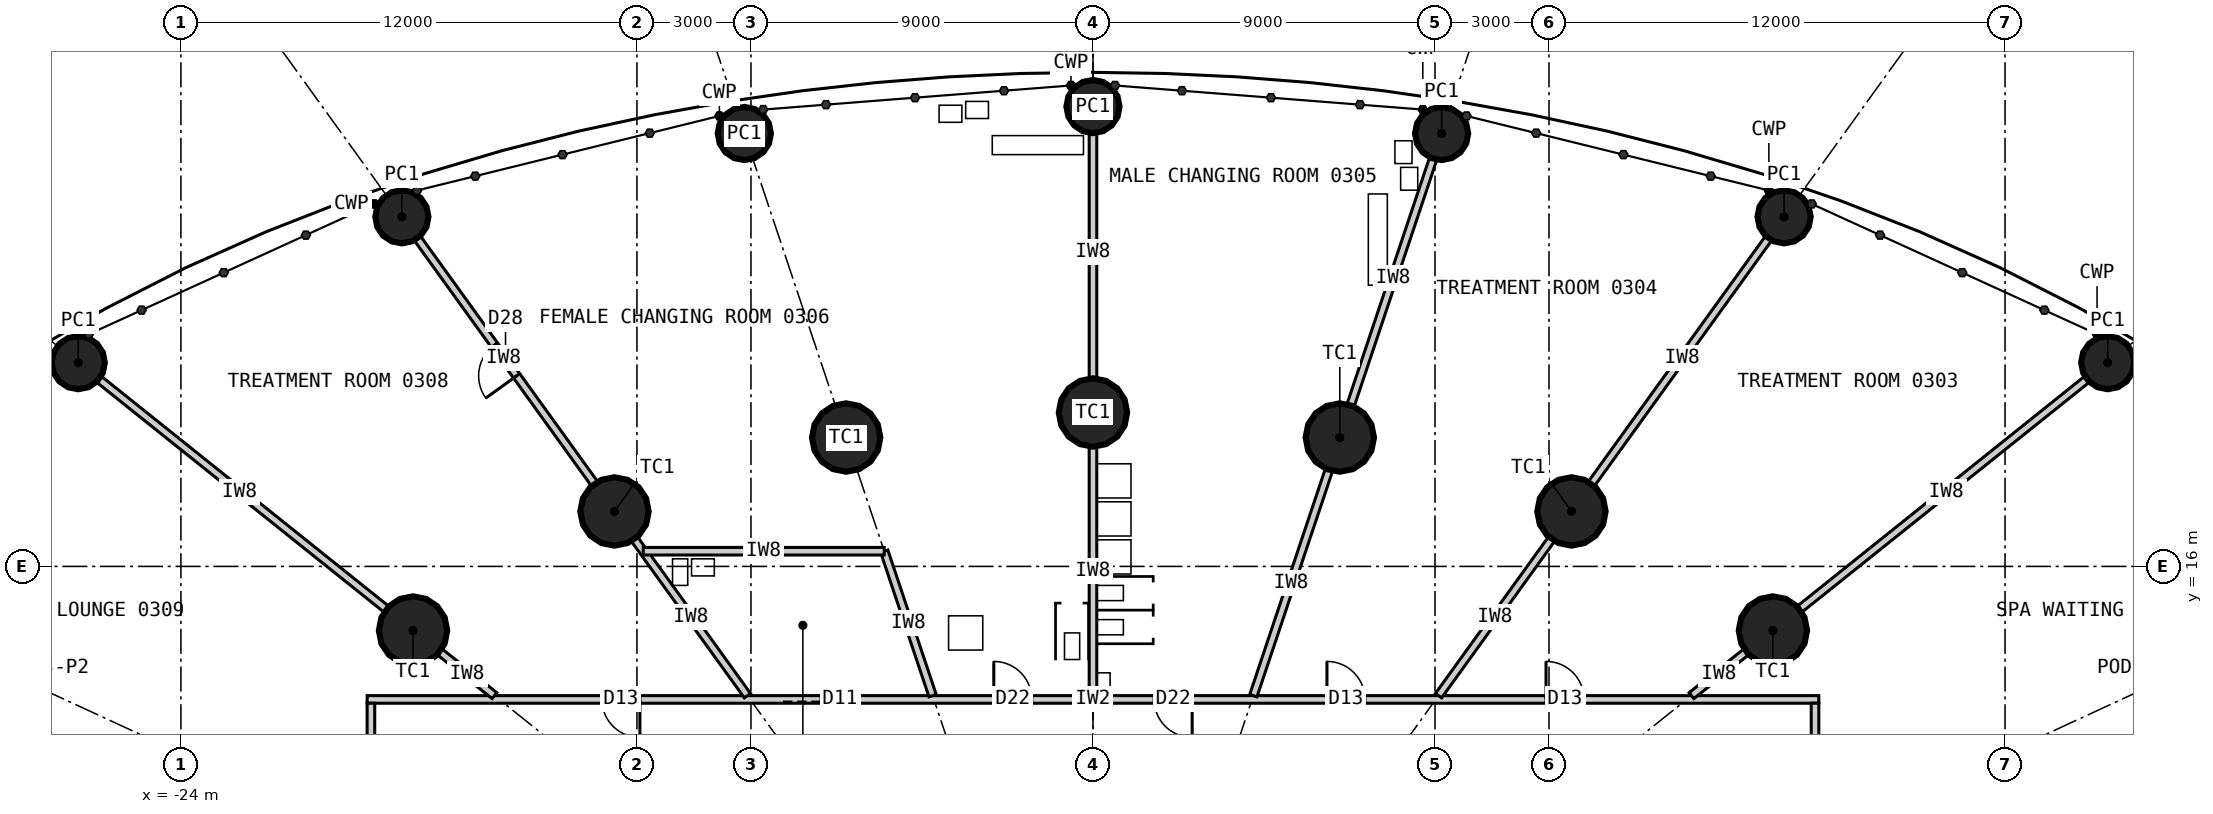
"""IFC4 building model, lengths in metres.
Left out: names, types, materials, properties, quantities, classifications, styles, units other than length and angle.
Written with IfcOpenShell. Run it as: python <this file> out.ifc"""

import sys

from ifc_helpers import new_model, si_unit, direction, frame, frame_2d, origin, origin_2d, place, context, subcontext, project, spatial, rectangle, circle, extrude, element, fill, save


model = new_model("IFC4")
c1 = context("Model", 3, precision=1e-05, world=origin(), true_north=direction((0.0, 1.0)))
c2 = subcontext(c1, "Body", "Model", "MODEL_VIEW")
j1 = project(units=[si_unit("LENGTHUNIT", "METRE"), si_unit("PLANEANGLEUNIT", "RADIAN")], contexts=[c1])
p1 = place(None, origin())
s1 = spatial("IfcSite", under=j1, at=p1, CompositionType="ELEMENT")
p2 = place(p1, origin())
s2 = spatial("IfcBuilding", under=s1, at=p2, CompositionType="ELEMENT")
p3 = place(p2, frame((0.0, 0.0, 19.2)))
s3 = spatial("IfcBuildingStorey", under=s2, at=p3, CompositionType="ELEMENT", Elevation=19.2)
for number, where, z_axis, x_axis in (
    (1, (17.892, 14.313, 0.0), (0.0, 0.0, 1.0), (1.0, 0.0, 0.0)),
    (2, (12.591, 17.447, 0.0), (0.0, 0.0, 1.0), (1.0, 0.0, 0.0)),
    (3, (6.495, 19.391, 0.0), (0.0, 0.0, 1.0), (1.0, 0.0, 0.0)),
    (4, (0.0, 20.05, 0.0), (0.0, 0.0, 1.0), (1.0, 0.0, 0.0)),
    (5, (-6.495, 19.391, 0.0), (0.0, 0.0, 1.0), (1.0, 0.0, 0.0)),
    (6, (-12.591, 17.447, 0.0), (0.0, 0.0, 1.0), (1.0, 0.0, 0.0)),
    (7, (-17.892, 14.313, 0.0), (0.0, 0.0, 1.0), (1.0, 0.0, 0.0)),
):
    element("IfcColumn", number, at=place(p3, frame(where, z_axis=z_axis, x_axis=x_axis)), inside=s3, PredefinedType="COLUMN", context=c2, shape_type="SweptSolid", body=[
        extrude(circle(Radius=0.9, at=origin_2d()), origin(), (0.0, 0.0, 1.0), 5.4),
    ])
for number, where, z_axis, x_axis in (
    (8, (26.702, 21.362, 0.0), (0.0, 0.0, 1.0), (1.0, 0.0, 0.0)),
    (9, (18.186, 25.199, 0.0), (0.0, 0.0, 1.0), (1.0, 0.0, 0.0)),
    (10, (9.174, 27.391, 0.0), (0.0, 0.0, 1.0), (1.0, 0.0, 0.0)),
    (11, (0.0, 28.1, 0.0), (0.0, 0.0, 1.0), (1.0, 0.0, 0.0)),
    (12, (-9.174, 27.391, 0.0), (0.0, 0.0, 1.0), (1.0, 0.0, 0.0)),
    (13, (-18.186, 25.199, 0.0), (0.0, 0.0, 1.0), (1.0, 0.0, 0.0)),
    (14, (-26.702, 21.362, 0.0), (0.0, 0.0, 1.0), (1.0, 0.0, 0.0)),
):
    element("IfcColumn", number, at=place(p3, frame(where, z_axis=z_axis, x_axis=x_axis)), inside=s3, PredefinedType="COLUMN", context=c2, shape_type="SweptSolid", body=[
        extrude(circle(Radius=0.7, at=origin_2d()), origin(), (0.0, 0.0, 1.0), 5.4),
    ])
p4 = place(p3, frame((-19.1, 12.5, 0.0), z_axis=(0.0, 0.0, 1.0), x_axis=(1.0, 0.0, 0.0)))
e15 = element("IfcWall", 15, at=p4, inside=s3, PredefinedType="PARTITIONING", context=c2, shape_type="SweptSolid", body=[
    extrude(rectangle(XDim=38.2, YDim=0.2, at=frame_2d((19.1, 0.0))), origin(), (0.0, 0.0, 1.0), 5.15),
])
p5 = place(p4, frame((31.022, 0.0, 0.0)))
e16 = element("IfcOpeningElement", 16, at=p5, cuts=e15, PredefinedType="OPENING", context=c2, shape_type="SweptSolid", body=[
    extrude(rectangle(XDim=1.0, YDim=2.2, at=frame_2d((0.5, 1.1))), frame((0.0, 0.11, 0.0), z_axis=(0.0, -1.0, 0.0), x_axis=(1.0, 0.0, 0.0)), (0.0, 0.0, 1.0), 0.22),
])
p6 = place(p4, frame((25.257, 0.0, 0.0)))
e17 = element("IfcOpeningElement", 17, at=p6, cuts=e15, PredefinedType="OPENING", context=c2, shape_type="SweptSolid", body=[
    extrude(rectangle(XDim=1.0, YDim=2.2, at=frame_2d((0.5, 1.1))), frame((0.0, 0.11, 0.0), z_axis=(0.0, -1.0, 0.0), x_axis=(1.0, 0.0, 0.0)), (0.0, 0.0, 1.0), 0.22),
])
p7 = place(p4, frame((20.71, 0.0, 0.0)))
e18 = element("IfcOpeningElement", 18, at=p7, cuts=e15, PredefinedType="OPENING", context=c2, shape_type="SweptSolid", body=[
    extrude(rectangle(XDim=1.0, YDim=2.1, at=frame_2d((0.5, 1.05))), frame((0.0, 0.11, 0.0), z_axis=(0.0, -1.0, 0.0), x_axis=(1.0, 0.0, 0.0)), (0.0, 0.0, 1.0), 0.22),
])
p8 = place(p4, frame((16.49, 0.0, 0.0)))
e19 = element("IfcOpeningElement", 19, at=p8, cuts=e15, PredefinedType="OPENING", context=c2, shape_type="SweptSolid", body=[
    extrude(rectangle(XDim=1.0, YDim=2.1, at=frame_2d((0.5, 1.05))), frame((0.0, 0.11, 0.0), z_axis=(0.0, -1.0, 0.0), x_axis=(1.0, 0.0, 0.0)), (0.0, 0.0, 1.0), 0.22),
])
p9 = place(p4, frame((11.943, 0.0, 0.0)))
e20 = element("IfcOpeningElement", 20, at=p9, cuts=e15, PredefinedType="OPENING", context=c2, shape_type="SweptSolid", body=[
    extrude(rectangle(XDim=1.0, YDim=2.2, at=frame_2d((0.5, 1.1))), frame((0.0, 0.11, 0.0), z_axis=(0.0, -1.0, 0.0), x_axis=(1.0, 0.0, 0.0)), (0.0, 0.0, 1.0), 0.22),
])
p10 = place(p4, frame((6.178, 0.0, 0.0)))
e21 = element("IfcOpeningElement", 21, at=p10, cuts=e15, PredefinedType="OPENING", context=c2, shape_type="SweptSolid", body=[
    extrude(rectangle(XDim=1.0, YDim=2.2, at=frame_2d((0.5, 1.1))), frame((0.0, 0.11, 0.0), z_axis=(0.0, -1.0, 0.0), x_axis=(1.0, 0.0, 0.0)), (0.0, 0.0, 1.0), 0.22),
])
p11 = place(p3, frame((19.0, -12.4, 0.0), z_axis=(0.0, 0.0, 1.0), x_axis=(0.0, 1.0, 0.0)))
e22 = element("IfcWall", 22, at=p11, inside=s3, PredefinedType="PARTITIONING", context=c2, shape_type="SweptSolid", body=[
    extrude(rectangle(XDim=24.8, YDim=0.2, at=frame_2d((12.4, 0.0))), origin(), (0.0, 0.0, 1.0), 5.15),
])
p12 = place(p11, frame((17.8, 0.0, 0.0)))
e23 = element("IfcOpeningElement", 23, at=p12, cuts=e22, PredefinedType="OPENING", context=c2, shape_type="SweptSolid", body=[
    extrude(rectangle(XDim=1.8, YDim=2.4, at=frame_2d((0.9, 1.2))), frame((0.0, 0.11, 0.0), z_axis=(0.0, -1.0, 0.0), x_axis=(1.0, 0.0, 0.0)), (0.0, 0.0, 1.0), 0.22),
])
p13 = place(p3, frame((-19.0, 12.4, 0.0), z_axis=(0.0, 0.0, 1.0), x_axis=(0.0, -1.0, 0.0)))
e24 = element("IfcWall", 24, at=p13, inside=s3, PredefinedType="PARTITIONING", context=c2, shape_type="SweptSolid", body=[
    extrude(rectangle(XDim=24.8, YDim=0.2, at=frame_2d((12.4, 0.0))), origin(), (0.0, 0.0, 1.0), 5.15),
])
p14 = place(p13, frame((5.2, 0.0, 0.0)))
e25 = element("IfcOpeningElement", 25, at=p14, cuts=e24, PredefinedType="OPENING", context=c2, shape_type="SweptSolid", body=[
    extrude(rectangle(XDim=1.8, YDim=2.4, at=frame_2d((0.9, 1.2))), frame((0.0, 0.11, 0.0), z_axis=(0.0, -1.0, 0.0), x_axis=(1.0, 0.0, 0.0)), (0.0, 0.0, 1.0), 0.22),
])
p15 = place(p13, frame((17.8, 0.0, 0.0)))
e26 = element("IfcOpeningElement", 26, at=p15, cuts=e24, PredefinedType="OPENING", context=c2, shape_type="SweptSolid", body=[
    extrude(rectangle(XDim=1.8, YDim=2.4, at=frame_2d((0.9, 1.2))), frame((0.0, 0.11, 0.0), z_axis=(0.0, -1.0, 0.0), x_axis=(1.0, 0.0, 0.0)), (0.0, 0.0, 1.0), 0.22),
])
p16 = place(p3, frame((15.75, 12.6, 0.0), z_axis=(0.0, 0.0, 1.0), x_axis=(0.780881734892, 0.6246788904, 0.0)))
e27 = element("IfcWall", 27, at=p16, inside=s3, PredefinedType="PARTITIONING", context=c2, shape_type="SweptSolid", body=[
    extrude(rectangle(XDim=1.843, YDim=0.2, at=frame_2d((0.921, 0.0))), origin(), (0.0, 0.0, 1.0), 4.3),
])
p17 = place(p3, frame((18.594, 14.875, 0.0), z_axis=(0.0, 0.0, 1.0), x_axis=(0.780868809443, 0.624695047554, 0.0)))
e28 = element("IfcWall", 28, at=p17, inside=s3, PredefinedType="PARTITIONING", context=c2, shape_type="SweptSolid", body=[
    extrude(rectangle(XDim=9.883, YDim=0.2, at=frame_2d((4.941, 0.0))), origin(), (0.0, 0.0, 1.0), 4.25),
])
p18 = place(p3, frame((9.093, 12.6, 0.0), z_axis=(0.0, 0.0, 1.0), x_axis=(0.58522538525, 0.810870673079, 0.0)))
e29 = element("IfcWall", 29, at=p18, inside=s3, PredefinedType="PARTITIONING", context=c2, shape_type="SweptSolid", body=[
    extrude(rectangle(XDim=5.077, YDim=0.2, at=frame_2d((2.538, 0.0))), origin(), (0.0, 0.0, 1.0), 4.3),
])
p19 = place(p3, frame((13.118, 18.176, 0.0), z_axis=(0.0, 0.0, 1.0), x_axis=(0.585204349301, 0.810885854828, 0.0)))
e30 = element("IfcWall", 30, at=p19, inside=s3, PredefinedType="PARTITIONING", context=c2, shape_type="SweptSolid", body=[
    extrude(rectangle(XDim=8.161, YDim=0.2, at=frame_2d((4.081, 0.0))), origin(), (0.0, 0.0, 1.0), 4.25),
])
p20 = place(p3, frame((4.22, 12.6, 0.0), z_axis=(0.0, 0.0, 1.0), x_axis=(0.317584173452, 0.9482300843, 0.0)))
e31 = element("IfcWall", 31, at=p20, inside=s3, PredefinedType="PARTITIONING", context=c2, shape_type="SweptSolid", body=[
    extrude(rectangle(XDim=6.262, YDim=0.2, at=frame_2d((3.131, 0.0))), origin(), (0.0, 0.0, 1.0), 4.3),
])
p21 = place(p3, frame((6.781, 20.245, 0.0), z_axis=(0.0, 0.0, 1.0), x_axis=(0.317580622989, 0.948231273425, 0.0)))
e32 = element("IfcWall", 32, at=p21, inside=s3, PredefinedType="PARTITIONING", context=c2, shape_type="SweptSolid", body=[
    extrude(rectangle(XDim=7.036, YDim=0.2, at=frame_2d((3.518, 0.0))), origin(), (0.0, 0.0, 1.0), 4.25),
])
p22 = place(p3, frame((0.0, 12.6, 0.0), z_axis=(0.0, 0.0, 1.0), x_axis=(0.0, 1.0, 0.0)))
e33 = element("IfcWall", 33, at=p22, inside=s3, PredefinedType="PARTITIONING", context=c2, shape_type="SweptSolid", body=[
    extrude(rectangle(XDim=6.55, YDim=0.2, at=frame_2d((3.275, 0.0))), origin(), (0.0, 0.0, 1.0), 4.3),
])
p23 = place(p3, frame((0.0, 20.95, 0.0), z_axis=(0.0, 0.0, 1.0), x_axis=(0.0, 1.0, 0.0)))
e34 = element("IfcWall", 34, at=p23, inside=s3, PredefinedType="PARTITIONING", context=c2, shape_type="SweptSolid", body=[
    extrude(rectangle(XDim=6.65, YDim=0.2, at=frame_2d((3.325, 0.0))), origin(), (0.0, 0.0, 1.0), 4.25),
])
p24 = place(p3, frame((-4.22, 12.6, 0.0), z_axis=(0.0, 0.0, 1.0), x_axis=(-0.317598232025, 0.948225375644, 0.0)))
e35 = element("IfcWall", 35, at=p24, inside=s3, PredefinedType="PARTITIONING", context=c2, shape_type="SweptSolid", body=[
    extrude(rectangle(XDim=4.007, YDim=0.2, at=frame_2d((2.004, 0.0))), origin(), (0.0, 0.0, 1.0), 4.3),
])
p25 = place(p3, frame((-9.093, 12.6, 0.0), z_axis=(0.0, 0.0, 1.0), x_axis=(-0.58522538525, 0.810870673079, 0.0)))
e36 = element("IfcWall", 36, at=p25, inside=s3, PredefinedType="PARTITIONING", context=c2, shape_type="SweptSolid", body=[
    extrude(rectangle(XDim=5.077, YDim=0.2, at=frame_2d((2.538, 0.0))), origin(), (0.0, 0.0, 1.0), 4.3),
])
p26 = place(p3, frame((-13.118, 18.176, 0.0), z_axis=(0.0, 0.0, 1.0), x_axis=(-0.585204349301, 0.810885854828, 0.0)))
e37 = element("IfcWall", 37, at=p26, inside=s3, PredefinedType="PARTITIONING", context=c2, shape_type="SweptSolid", body=[
    extrude(rectangle(XDim=8.161, YDim=0.2, at=frame_2d((4.081, 0.0))), origin(), (0.0, 0.0, 1.0), 4.25),
])
p27 = place(p26, frame((3.5, 0.0, 0.0)))
e38 = element("IfcOpeningElement", 38, at=p27, cuts=e37, PredefinedType="OPENING", context=c2, shape_type="SweptSolid", body=[
    extrude(rectangle(XDim=1.0, YDim=2.2, at=frame_2d((0.5, 1.1))), frame((0.0, 0.11, 0.0), z_axis=(0.0, -1.0, 0.0), x_axis=(1.0, 0.0, 0.0)), (0.0, 0.0, 1.0), 0.22),
])
p28 = place(p3, frame((-15.75, 12.6, 0.0), z_axis=(0.0, 0.0, 1.0), x_axis=(-0.780881734892, 0.6246788904, 0.0)))
e39 = element("IfcWall", 39, at=p28, inside=s3, PredefinedType="PARTITIONING", context=c2, shape_type="SweptSolid", body=[
    extrude(rectangle(XDim=1.843, YDim=0.2, at=frame_2d((0.921, 0.0))), origin(), (0.0, 0.0, 1.0), 4.3),
])
p29 = place(p3, frame((-18.594, 14.875, 0.0), z_axis=(0.0, 0.0, 1.0), x_axis=(-0.780868809443, 0.624695047554, 0.0)))
e40 = element("IfcWall", 40, at=p29, inside=s3, PredefinedType="PARTITIONING", context=c2, shape_type="SweptSolid", body=[
    extrude(rectangle(XDim=9.883, YDim=0.2, at=frame_2d((4.941, 0.0))), origin(), (0.0, 0.0, 1.0), 4.25),
])
p30 = place(p3, frame((-5.493, 16.4, 0.0), z_axis=(0.0, 0.0, 1.0), x_axis=(-1.0, 0.0, 0.0)))
e41 = element("IfcWall", 41, at=p30, inside=s3, PredefinedType="PARTITIONING", context=c2, shape_type="SweptSolid", body=[
    extrude(rectangle(XDim=6.343, YDim=0.2, at=frame_2d((3.171, 0.0))), origin(), (0.0, 0.0, 1.0), 4.5),
])
p31 = place(p5, origin())
e42 = element("IfcDoor", 42, at=p31, inside=s3, OperationType="SINGLE_SWING_LEFT", PredefinedType="DOOR", context=c2, shape_type="SweptSolid", body=[
    extrude(rectangle(XDim=1.0, YDim=2.2, at=frame_2d((0.5, 1.1))), frame((0.0, 0.025, 0.0), z_axis=(0.0, -1.0, 0.0), x_axis=(1.0, 0.0, 0.0)), (0.0, 0.0, 1.0), 0.05),
])
fill(e16, e42)
p32 = place(p6, origin())
e43 = element("IfcDoor", 43, at=p32, inside=s3, OperationType="SINGLE_SWING_LEFT", PredefinedType="DOOR", context=c2, shape_type="SweptSolid", body=[
    extrude(rectangle(XDim=1.0, YDim=2.2, at=frame_2d((0.5, 1.1))), frame((0.0, 0.025, 0.0), z_axis=(0.0, -1.0, 0.0), x_axis=(1.0, 0.0, 0.0)), (0.0, 0.0, 1.0), 0.05),
])
fill(e17, e43)
p33 = place(p7, origin())
e44 = element("IfcDoor", 44, at=p33, inside=s3, OperationType="SINGLE_SWING_RIGHT", PredefinedType="DOOR", context=c2, shape_type="SweptSolid", body=[
    extrude(rectangle(XDim=1.0, YDim=2.1, at=frame_2d((0.5, 1.05))), frame((0.0, 0.025, 0.0), z_axis=(0.0, -1.0, 0.0), x_axis=(1.0, 0.0, 0.0)), (0.0, 0.0, 1.0), 0.05),
])
fill(e18, e44)
p34 = place(p8, origin())
e45 = element("IfcDoor", 45, at=p34, inside=s3, OperationType="SINGLE_SWING_LEFT", PredefinedType="DOOR", context=c2, shape_type="SweptSolid", body=[
    extrude(rectangle(XDim=1.0, YDim=2.1, at=frame_2d((0.5, 1.05))), frame((0.0, 0.025, 0.0), z_axis=(0.0, -1.0, 0.0), x_axis=(1.0, 0.0, 0.0)), (0.0, 0.0, 1.0), 0.05),
])
fill(e19, e45)
p35 = place(p9, origin())
e46 = element("IfcDoor", 46, at=p35, inside=s3, OperationType="SLIDING_TO_LEFT", PredefinedType="DOOR", context=c2, shape_type="SweptSolid", body=[
    extrude(rectangle(XDim=1.0, YDim=2.2, at=frame_2d((0.5, 1.1))), frame((0.0, 0.025, 0.0), z_axis=(0.0, -1.0, 0.0), x_axis=(1.0, 0.0, 0.0)), (0.0, 0.0, 1.0), 0.05),
])
fill(e20, e46)
p36 = place(p10, origin())
e47 = element("IfcDoor", 47, at=p36, inside=s3, OperationType="SINGLE_SWING_RIGHT", PredefinedType="DOOR", context=c2, shape_type="SweptSolid", body=[
    extrude(rectangle(XDim=1.0, YDim=2.2, at=frame_2d((0.5, 1.1))), frame((0.0, 0.025, 0.0), z_axis=(0.0, -1.0, 0.0), x_axis=(1.0, 0.0, 0.0)), (0.0, 0.0, 1.0), 0.05),
])
fill(e21, e47)
p37 = place(p27, origin())
e48 = element("IfcDoor", 48, at=p37, inside=s3, OperationType="SINGLE_SWING_LEFT", PredefinedType="DOOR", context=c2, shape_type="SweptSolid", body=[
    extrude(rectangle(XDim=1.0, YDim=2.2, at=frame_2d((0.5, 1.1))), frame((0.0, 0.025, 0.0), z_axis=(0.0, -1.0, 0.0), x_axis=(1.0, 0.0, 0.0)), (0.0, 0.0, 1.0), 0.05),
])
fill(e38, e48)
save(model, sys.argv[1])
